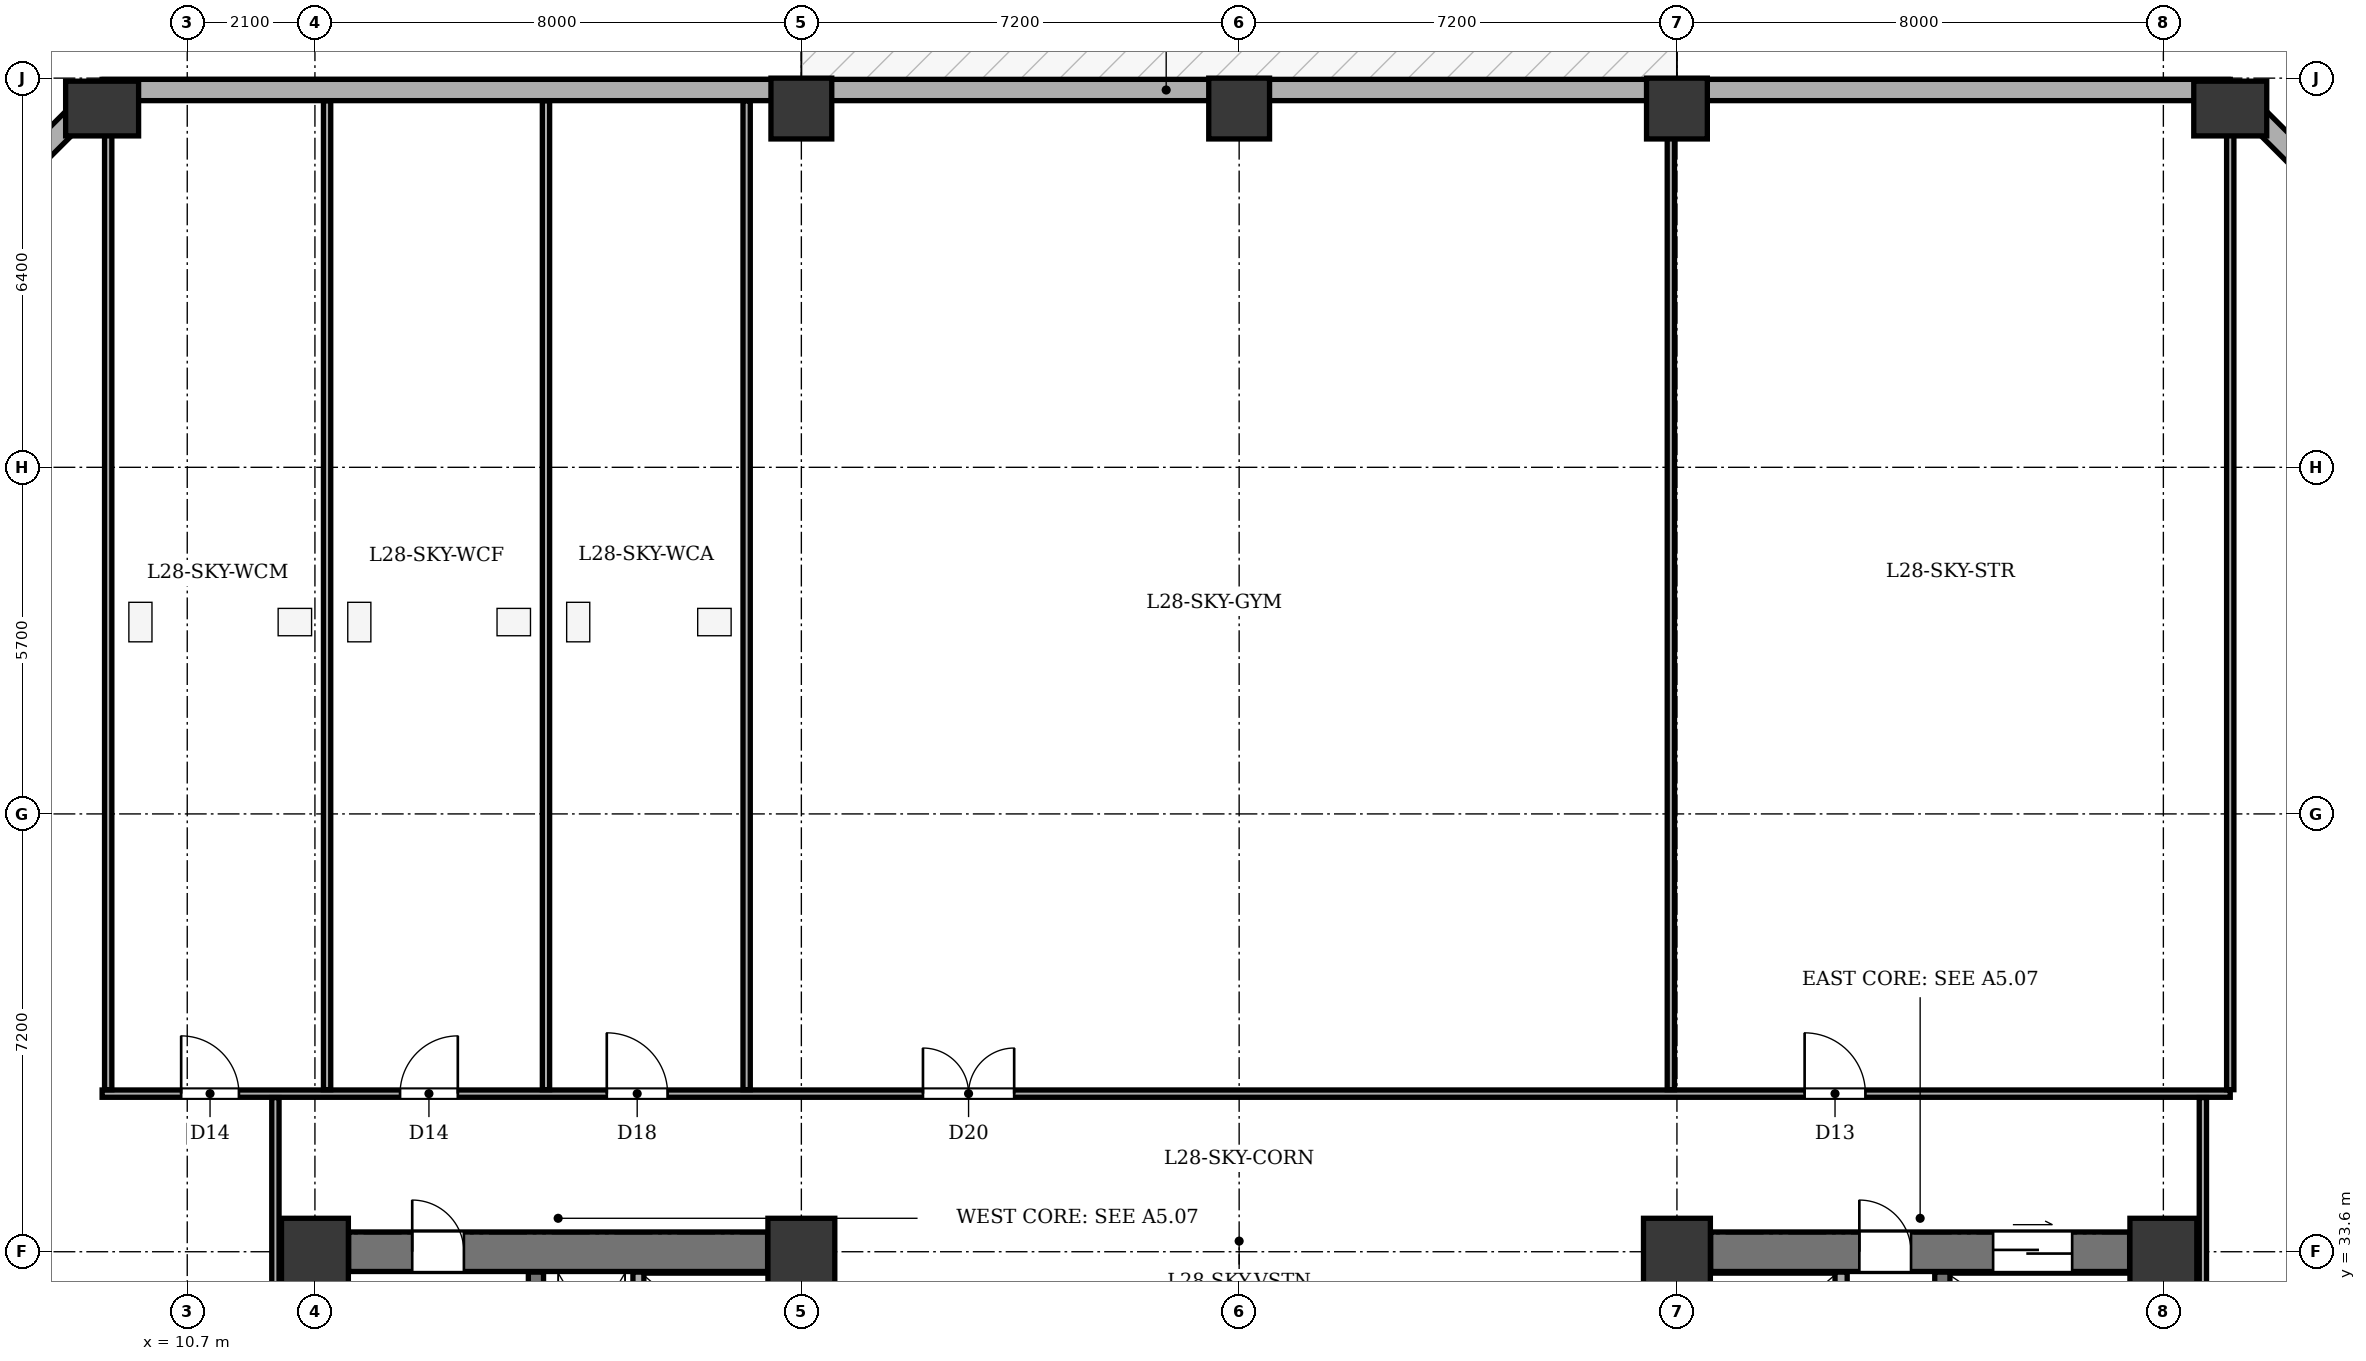
"""IFC4 building model, lengths in metres.
Left out: names, types, materials, properties, quantities, classifications, styles, units other than length and angle.
Written with IfcOpenShell. Run it as: python <this file> out.ifc"""

import sys

from ifc_helpers import new_model, si_unit, direction, frame, frame_2d, origin, origin_2d, place, context, subcontext, project, spatial, rectangle, extrude, element, fill, save


model = new_model("IFC4")
c1 = context("Model", 3, precision=1e-05, world=origin(), true_north=direction((0.0, 1.0)))
c2 = subcontext(c1, "Body", "Model", "MODEL_VIEW")
j1 = project(units=[si_unit("LENGTHUNIT", "METRE"), si_unit("PLANEANGLEUNIT", "RADIAN")], contexts=[c1])
p1 = place(None, origin())
s1 = spatial("IfcSite", under=j1, at=p1, CompositionType="ELEMENT")
p2 = place(p1, origin())
s2 = spatial("IfcBuilding", under=s1, at=p2, CompositionType="ELEMENT")
p3 = place(p2, frame((0.0, 0.0, 115.5)))
s3 = spatial("IfcBuildingStorey", under=s2, at=p3, CompositionType="ELEMENT", Elevation=115.5)
for number, where, z_axis, x_axis in (
    (1, (12.8, 33.6, 0.0), (0.0, 0.0, 1.0), (1.0, 0.0, 0.0)),
    (2, (20.8, 33.6, 0.0), (0.0, 0.0, 1.0), (1.0, 0.0, 0.0)),
    (3, (35.2, 33.6, 0.0), (0.0, 0.0, 1.0), (1.0, 0.0, 0.0)),
    (4, (43.2, 33.6, 0.0), (0.0, 0.0, 1.0), (1.0, 0.0, 0.0)),
):
    element("IfcColumn", number, at=place(p3, frame(where, z_axis=z_axis, x_axis=x_axis)), inside=s3, PredefinedType="COLUMN", context=c2, shape_type="SweptSolid", body=[
        extrude(rectangle(XDim=1.1, YDim=1.1, at=origin_2d()), origin(), (0.0, 0.0, 1.0), 4.8),
    ])
p4 = place(p3, frame((9.3, 52.4, 0.0), z_axis=(0.0, 0.0, 1.0), x_axis=(1.0, 0.0, 0.0)))
e5 = element("IfcColumn", 5, at=p4, inside=s3, PredefinedType="COLUMN", context=c2, shape_type="SweptSolid", body=[
    extrude(rectangle(XDim=0.9, YDim=1.2, at=origin_2d()), origin(), (0.0, 0.0, 1.0), 4.8),
])
for number, where, z_axis, x_axis in (
    (6, (20.8, 52.4, 0.0), (0.0, 0.0, 1.0), (1.0, 0.0, 0.0)),
    (7, (28.0, 52.4, 0.0), (0.0, 0.0, 1.0), (1.0, 0.0, 0.0)),
    (8, (35.2, 52.4, 0.0), (0.0, 0.0, 1.0), (1.0, 0.0, 0.0)),
):
    element("IfcColumn", number, at=place(p3, frame(where, z_axis=z_axis, x_axis=x_axis)), inside=s3, PredefinedType="COLUMN", context=c2, shape_type="SweptSolid", body=[
        extrude(rectangle(XDim=1.0, YDim=1.0, at=origin_2d()), origin(), (0.0, 0.0, 1.0), 4.8),
    ])
p5 = place(p3, frame((44.3, 52.4, 0.0), z_axis=(0.0, 0.0, 1.0), x_axis=(1.0, 0.0, 0.0)))
e9 = element("IfcColumn", 9, at=p5, inside=s3, PredefinedType="COLUMN", context=c2, shape_type="SweptSolid", body=[
    extrude(rectangle(XDim=0.9, YDim=1.2, at=origin_2d()), origin(), (0.0, 0.0, 1.0), 4.8),
])
p6 = place(p3, frame((4.495, 47.9, 0.0), z_axis=(0.0, 0.0, 1.0), x_axis=(0.707088817216, 0.7071247447, 0.0)))
e10 = element("IfcWall", 10, at=p6, inside=s3, PredefinedType="STANDARD", context=c2, shape_type="SweptSolid", body=[
    extrude(rectangle(XDim=6.795, YDim=0.35, at=frame_2d((3.398, 0.0))), origin(), (0.0, 0.0, 1.0), 3.735),
])
p7 = place(p3, frame((9.3, 52.705, 0.0), z_axis=(0.0, 0.0, 1.0), x_axis=(1.0, 0.0, 0.0)))
e11 = element("IfcWall", 11, at=p7, inside=s3, PredefinedType="STANDARD", context=c2, shape_type="SweptSolid", body=[
    extrude(rectangle(XDim=35.0, YDim=0.35, at=frame_2d((17.5, 0.0))), origin(), (0.0, 0.0, 1.0), 3.735),
])
p8 = place(p3, frame((44.3, 52.705, 0.0), z_axis=(0.0, 0.0, 1.0), x_axis=(0.707088817216, -0.7071247447, 0.0)))
e12 = element("IfcWall", 12, at=p8, inside=s3, PredefinedType="STANDARD", context=c2, shape_type="SweptSolid", body=[
    extrude(rectangle(XDim=6.795, YDim=0.35, at=frame_2d((3.398, 0.0))), origin(), (0.0, 0.0, 1.0), 3.735),
])
p9 = place(p3, frame((13.355, 33.6, 0.0), z_axis=(0.0, 0.0, 1.0), x_axis=(1.0, 0.0, 0.0)))
e13 = element("IfcWall", 13, at=p9, inside=s3, PredefinedType="SHEAR", context=c2, shape_type="SweptSolid", body=[
    extrude(rectangle(XDim=6.89, YDim=0.65, at=frame_2d((3.445, 0.0))), origin(), (0.0, 0.0, 1.0), 4.35),
])
p10 = place(p9, frame((1.045, 0.0, 0.0)))
e14 = element("IfcOpeningElement", 14, at=p10, cuts=e13, PredefinedType="OPENING", context=c2, shape_type="SweptSolid", body=[
    extrude(rectangle(XDim=0.85, YDim=2.02, at=frame_2d((0.425, 1.01))), frame((0.0, 0.335, 0.0), z_axis=(0.0, -1.0, 0.0), x_axis=(1.0, 0.0, 0.0)), (0.0, 0.0, 1.0), 0.67),
])
p11 = place(p3, frame((16.435, 21.135, 0.0), z_axis=(0.0, 0.0, 1.0), x_axis=(0.0, 1.0, 0.0)))
e15 = element("IfcWall", 15, at=p11, inside=s3, PredefinedType="SHEAR", context=c2, shape_type="SweptSolid", body=[
    extrude(rectangle(XDim=12.13, YDim=0.25, at=frame_2d((6.065, 0.0))), origin(), (0.0, 0.0, 1.0), 4.35),
])
p12 = place(p11, frame((0.515, 0.0, 0.0)))
e16 = element("IfcOpeningElement", 16, at=p12, cuts=e15, PredefinedType="OPENING", context=c2, shape_type="SweptSolid", body=[
    extrude(rectangle(XDim=1.2, YDim=2.15, at=frame_2d((0.6, 1.075))), frame((0.0, 0.135, 0.0), z_axis=(0.0, -1.0, 0.0), x_axis=(1.0, 0.0, 0.0)), (0.0, 0.0, 1.0), 0.27),
])
p13 = place(p11, frame((2.665, 0.0, 0.0)))
e17 = element("IfcOpeningElement", 17, at=p13, cuts=e15, PredefinedType="OPENING", context=c2, shape_type="SweptSolid", body=[
    extrude(rectangle(XDim=1.15, YDim=2.15, at=frame_2d((0.575, 1.075))), frame((0.0, 0.135, 0.0), z_axis=(0.0, -1.0, 0.0), x_axis=(1.0, 0.0, 0.0)), (0.0, 0.0, 1.0), 0.27),
])
p14 = place(p3, frame((18.12, 31.17, 0.0), z_axis=(0.0, 0.0, 1.0), x_axis=(0.0, 1.0, 0.0)))
e18 = element("IfcWall", 18, at=p14, inside=s3, PredefinedType="PARTITIONING", context=c2, shape_type="SweptSolid", body=[
    extrude(rectangle(XDim=2.095, YDim=0.18, at=frame_2d((1.047, 0.0))), origin(), (0.0, 0.0, 1.0), 4.35),
])
p15 = place(p3, frame((35.755, 33.6, 0.0), z_axis=(0.0, 0.0, 1.0), x_axis=(1.0, 0.0, 0.0)))
e19 = element("IfcWall", 19, at=p15, inside=s3, PredefinedType="SHEAR", context=c2, shape_type="SweptSolid", body=[
    extrude(rectangle(XDim=6.89, YDim=0.65, at=frame_2d((3.445, 0.0))), origin(), (0.0, 0.0, 1.0), 4.35),
])
p16 = place(p15, frame((4.645, 0.0, 0.0)))
e20 = element("IfcOpeningElement", 20, at=p16, cuts=e19, PredefinedType="OPENING", context=c2, shape_type="SweptSolid", body=[
    extrude(rectangle(XDim=1.3, YDim=2.15, at=frame_2d((0.65, 1.075))), frame((0.0, 0.335, 0.0), z_axis=(0.0, -1.0, 0.0), x_axis=(1.0, 0.0, 0.0)), (0.0, 0.0, 1.0), 0.67),
])
p17 = place(p15, frame((2.445, 0.0, 0.0)))
e21 = element("IfcOpeningElement", 21, at=p17, cuts=e19, PredefinedType="OPENING", context=c2, shape_type="SweptSolid", body=[
    extrude(rectangle(XDim=0.85, YDim=2.02, at=frame_2d((0.425, 1.01))), frame((0.0, 0.335, 0.0), z_axis=(0.0, -1.0, 0.0), x_axis=(1.0, 0.0, 0.0)), (0.0, 0.0, 1.0), 0.67),
])
p18 = place(p3, frame((39.565, 21.135, 0.0), z_axis=(0.0, 0.0, 1.0), x_axis=(0.0, 1.0, 0.0)))
e22 = element("IfcWall", 22, at=p18, inside=s3, PredefinedType="SHEAR", context=c2, shape_type="SweptSolid", body=[
    extrude(rectangle(XDim=12.13, YDim=0.25, at=frame_2d((6.065, 0.0))), origin(), (0.0, 0.0, 1.0), 4.35),
])
p19 = place(p18, frame((0.515, 0.0, 0.0)))
e23 = element("IfcOpeningElement", 23, at=p19, cuts=e22, PredefinedType="OPENING", context=c2, shape_type="SweptSolid", body=[
    extrude(rectangle(XDim=1.2, YDim=2.15, at=frame_2d((0.6, 1.075))), frame((0.0, 0.135, 0.0), z_axis=(0.0, -1.0, 0.0), x_axis=(1.0, 0.0, 0.0)), (0.0, 0.0, 1.0), 0.27),
])
p20 = place(p18, frame((2.665, 0.0, 0.0)))
e24 = element("IfcOpeningElement", 24, at=p20, cuts=e22, PredefinedType="OPENING", context=c2, shape_type="SweptSolid", body=[
    extrude(rectangle(XDim=1.15, YDim=2.15, at=frame_2d((0.575, 1.075))), frame((0.0, 0.135, 0.0), z_axis=(0.0, -1.0, 0.0), x_axis=(1.0, 0.0, 0.0)), (0.0, 0.0, 1.0), 0.27),
])
p21 = place(p3, frame((37.9, 25.27, 0.0), z_axis=(0.0, 0.0, 1.0), x_axis=(0.0, 1.0, 0.0)))
e25 = element("IfcWall", 25, at=p21, inside=s3, PredefinedType="SOLIDWALL", context=c2, shape_type="SweptSolid", body=[
    extrude(rectangle(XDim=7.995, YDim=0.2, at=frame_2d((3.998, 0.0))), origin(), (0.0, 0.0, 1.0), 4.35),
])
p22 = place(p3, frame((9.3, 36.2, 0.0), z_axis=(0.0, 0.0, 1.0), x_axis=(1.0, 0.0, 0.0)))
e26 = element("IfcWall", 26, at=p22, inside=s3, PredefinedType="PARTITIONING", context=c2, shape_type="SweptSolid", body=[
    extrude(rectangle(XDim=35.0, YDim=0.12, at=frame_2d((17.5, 0.0))), origin(), (0.0, 0.0, 1.0), 4.35),
])
p23 = place(p22, frame((1.3, 0.0, 0.0)))
e27 = element("IfcOpeningElement", 27, at=p23, cuts=e26, PredefinedType="OPENING", context=c2, shape_type="SweptSolid", body=[
    extrude(rectangle(XDim=0.95, YDim=2.1, at=frame_2d((0.475, 1.05))), frame((0.0, 0.07, 0.0), z_axis=(0.0, -1.0, 0.0), x_axis=(1.0, 0.0, 0.0)), (0.0, 0.0, 1.0), 0.14),
])
p24 = place(p22, frame((4.9, 0.0, 0.0)))
e28 = element("IfcOpeningElement", 28, at=p24, cuts=e26, PredefinedType="OPENING", context=c2, shape_type="SweptSolid", body=[
    extrude(rectangle(XDim=0.95, YDim=2.1, at=frame_2d((0.475, 1.05))), frame((0.0, 0.07, 0.0), z_axis=(0.0, -1.0, 0.0), x_axis=(1.0, 0.0, 0.0)), (0.0, 0.0, 1.0), 0.14),
])
p25 = place(p22, frame((8.3, 0.0, 0.0)))
e29 = element("IfcOpeningElement", 29, at=p25, cuts=e26, PredefinedType="OPENING", context=c2, shape_type="SweptSolid", body=[
    extrude(rectangle(XDim=1.0, YDim=2.1, at=frame_2d((0.5, 1.05))), frame((0.0, 0.07, 0.0), z_axis=(0.0, -1.0, 0.0), x_axis=(1.0, 0.0, 0.0)), (0.0, 0.0, 1.0), 0.14),
])
p26 = place(p22, frame((13.5, 0.0, 0.0)))
e30 = element("IfcOpeningElement", 30, at=p26, cuts=e26, PredefinedType="OPENING", context=c2, shape_type="SweptSolid", body=[
    extrude(rectangle(XDim=1.5, YDim=2.15, at=frame_2d((0.75, 1.075))), frame((0.0, 0.07, 0.0), z_axis=(0.0, -1.0, 0.0), x_axis=(1.0, 0.0, 0.0)), (0.0, 0.0, 1.0), 0.14),
])
p27 = place(p22, frame((28.0, 0.0, 0.0)))
e31 = element("IfcOpeningElement", 31, at=p27, cuts=e26, PredefinedType="OPENING", context=c2, shape_type="SweptSolid", body=[
    extrude(rectangle(XDim=1.0, YDim=2.1, at=frame_2d((0.5, 1.05))), frame((0.0, 0.07, 0.0), z_axis=(0.0, -1.0, 0.0), x_axis=(1.0, 0.0, 0.0)), (0.0, 0.0, 1.0), 0.14),
])
p28 = place(p3, frame((9.4, 36.265, 0.0), z_axis=(0.0, 0.0, 1.0), x_axis=(0.0, 1.0, 0.0)))
e32 = element("IfcWall", 32, at=p28, inside=s3, PredefinedType="PARTITIONING", context=c2, shape_type="SweptSolid", body=[
    extrude(rectangle(XDim=16.26, YDim=0.12, at=frame_2d((8.13, 0.0))), origin(), (0.0, 0.0, 1.0), 2.935),
])
p29 = place(p3, frame((13.0, 36.265, 0.0), z_axis=(0.0, 0.0, 1.0), x_axis=(0.0, 1.0, 0.0)))
e33 = element("IfcWall", 33, at=p29, inside=s3, PredefinedType="PARTITIONING", context=c2, shape_type="SweptSolid", body=[
    extrude(rectangle(XDim=16.26, YDim=0.12, at=frame_2d((8.13, 0.0))), origin(), (0.0, 0.0, 1.0), 4.35),
])
p30 = place(p3, frame((16.6, 36.265, 0.0), z_axis=(0.0, 0.0, 1.0), x_axis=(0.0, 1.0, 0.0)))
e34 = element("IfcWall", 34, at=p30, inside=s3, PredefinedType="PARTITIONING", context=c2, shape_type="SweptSolid", body=[
    extrude(rectangle(XDim=16.26, YDim=0.12, at=frame_2d((8.13, 0.0))), origin(), (0.0, 0.0, 1.0), 3.785),
])
p31 = place(p3, frame((19.9, 36.265, 0.0), z_axis=(0.0, 0.0, 1.0), x_axis=(0.0, 1.0, 0.0)))
e35 = element("IfcWall", 35, at=p31, inside=s3, PredefinedType="PARTITIONING", context=c2, shape_type="SweptSolid", body=[
    extrude(rectangle(XDim=16.26, YDim=0.12, at=frame_2d((8.13, 0.0))), origin(), (0.0, 0.0, 1.0), 4.35),
])
p32 = place(p3, frame((44.3, 36.265, 0.0), z_axis=(0.0, 0.0, 1.0), x_axis=(0.0, 1.0, 0.0)))
e36 = element("IfcWall", 36, at=p32, inside=s3, PredefinedType="PARTITIONING", context=c2, shape_type="SweptSolid", body=[
    extrude(rectangle(XDim=16.26, YDim=0.12, at=frame_2d((8.13, 0.0))), origin(), (0.0, 0.0, 1.0), 2.935),
])
p33 = place(p3, frame((35.1, 36.265, 0.0), z_axis=(0.0, 0.0, 1.0), x_axis=(0.0, 1.0, 0.0)))
e37 = element("IfcWall", 37, at=p33, inside=s3, PredefinedType="PARTITIONING", context=c2, shape_type="SweptSolid", body=[
    extrude(rectangle(XDim=16.26, YDim=0.12, at=frame_2d((8.13, 0.0))), origin(), (0.0, 0.0, 1.0), 3.535),
])
p34 = place(p3, frame((12.15, 18.465, 0.0), z_axis=(0.0, 0.0, 1.0), x_axis=(0.0, 1.0, 0.0)))
e38 = element("IfcWall", 38, at=p34, inside=s3, PredefinedType="PARTITIONING", context=c2, shape_type="SweptSolid", body=[
    extrude(rectangle(XDim=17.67, YDim=0.12, at=frame_2d((8.835, 0.0))), origin(), (0.0, 0.0, 1.0), 4.35),
])
p35 = place(p34, frame((0.385, 0.0, 0.0)))
e39 = element("IfcOpeningElement", 39, at=p35, cuts=e38, PredefinedType="OPENING", context=c2, shape_type="SweptSolid", body=[
    extrude(rectangle(XDim=1.1, YDim=2.15, at=frame_2d((0.55, 1.075))), frame((0.0, 0.07, 0.0), z_axis=(0.0, -1.0, 0.0), x_axis=(1.0, 0.0, 0.0)), (0.0, 0.0, 1.0), 0.14),
])
p36 = place(p3, frame((43.85, 18.465, 0.0), z_axis=(0.0, 0.0, 1.0), x_axis=(0.0, 1.0, 0.0)))
e40 = element("IfcWall", 40, at=p36, inside=s3, PredefinedType="PARTITIONING", context=c2, shape_type="SweptSolid", body=[
    extrude(rectangle(XDim=17.67, YDim=0.12, at=frame_2d((8.835, 0.0))), origin(), (0.0, 0.0, 1.0), 2.935),
])
p37 = place(p36, frame((0.385, 0.0, 0.0)))
e41 = element("IfcOpeningElement", 41, at=p37, cuts=e40, PredefinedType="OPENING", context=c2, shape_type="SweptSolid", body=[
    extrude(rectangle(XDim=1.1, YDim=2.15, at=frame_2d((0.55, 1.075))), frame((0.0, 0.07, 0.0), z_axis=(0.0, -1.0, 0.0), x_axis=(1.0, 0.0, 0.0)), (0.0, 0.0, 1.0), 0.14),
])
p38 = place(p10, origin())
e42 = element("IfcDoor", 42, at=p38, inside=s3, OperationType="SINGLE_SWING_LEFT", PredefinedType="DOOR", context=c2, shape_type="SweptSolid", body=[
    extrude(rectangle(XDim=0.85, YDim=2.02, at=frame_2d((0.425, 1.01))), frame((0.0, 0.025, 0.0), z_axis=(0.0, -1.0, 0.0), x_axis=(1.0, 0.0, 0.0)), (0.0, 0.0, 1.0), 0.05),
])
fill(e14, e42)
p39 = place(p16, origin())
e43 = element("IfcDoor", 43, at=p39, inside=s3, OperationType="DOUBLE_DOOR_SLIDING", PredefinedType="DOOR", context=c2, shape_type="SweptSolid", body=[
    extrude(rectangle(XDim=1.3, YDim=2.15, at=frame_2d((0.65, 1.075))), frame((0.0, 0.025, 0.0), z_axis=(0.0, -1.0, 0.0), x_axis=(1.0, 0.0, 0.0)), (0.0, 0.0, 1.0), 0.05),
])
fill(e20, e43)
p40 = place(p17, origin())
e44 = element("IfcDoor", 44, at=p40, inside=s3, OperationType="SINGLE_SWING_LEFT", PredefinedType="DOOR", context=c2, shape_type="SweptSolid", body=[
    extrude(rectangle(XDim=0.85, YDim=2.02, at=frame_2d((0.425, 1.01))), frame((0.0, 0.025, 0.0), z_axis=(0.0, -1.0, 0.0), x_axis=(1.0, 0.0, 0.0)), (0.0, 0.0, 1.0), 0.05),
])
fill(e21, e44)
p41 = place(p23, origin())
e45 = element("IfcDoor", 45, at=p41, inside=s3, OperationType="SINGLE_SWING_LEFT", PredefinedType="DOOR", context=c2, shape_type="SweptSolid", body=[
    extrude(rectangle(XDim=0.95, YDim=2.1, at=frame_2d((0.475, 1.05))), frame((0.0, 0.025, 0.0), z_axis=(0.0, -1.0, 0.0), x_axis=(1.0, 0.0, 0.0)), (0.0, 0.0, 1.0), 0.05),
])
fill(e27, e45)
p42 = place(p24, origin())
e46 = element("IfcDoor", 46, at=p42, inside=s3, OperationType="SINGLE_SWING_RIGHT", PredefinedType="DOOR", context=c2, shape_type="SweptSolid", body=[
    extrude(rectangle(XDim=0.95, YDim=2.1, at=frame_2d((0.475, 1.05))), frame((0.0, 0.025, 0.0), z_axis=(0.0, -1.0, 0.0), x_axis=(1.0, 0.0, 0.0)), (0.0, 0.0, 1.0), 0.05),
])
fill(e28, e46)
p43 = place(p25, origin())
e47 = element("IfcDoor", 47, at=p43, inside=s3, OperationType="SINGLE_SWING_LEFT", PredefinedType="DOOR", context=c2, shape_type="SweptSolid", body=[
    extrude(rectangle(XDim=1.0, YDim=2.1, at=frame_2d((0.5, 1.05))), frame((0.0, 0.025, 0.0), z_axis=(0.0, -1.0, 0.0), x_axis=(1.0, 0.0, 0.0)), (0.0, 0.0, 1.0), 0.05),
])
fill(e29, e47)
p44 = place(p26, origin())
e48 = element("IfcDoor", 48, at=p44, inside=s3, OperationType="DOUBLE_DOOR_SINGLE_SWING", PredefinedType="DOOR", context=c2, shape_type="SweptSolid", body=[
    extrude(rectangle(XDim=1.5, YDim=2.15, at=frame_2d((0.75, 1.075))), frame((0.0, 0.025, 0.0), z_axis=(0.0, -1.0, 0.0), x_axis=(1.0, 0.0, 0.0)), (0.0, 0.0, 1.0), 0.05),
])
fill(e30, e48)
p45 = place(p27, origin())
e49 = element("IfcDoor", 49, at=p45, inside=s3, OperationType="SINGLE_SWING_LEFT", PredefinedType="DOOR", context=c2, shape_type="SweptSolid", body=[
    extrude(rectangle(XDim=1.0, YDim=2.1, at=frame_2d((0.5, 1.05))), frame((0.0, 0.025, 0.0), z_axis=(0.0, -1.0, 0.0), x_axis=(1.0, 0.0, 0.0)), (0.0, 0.0, 1.0), 0.05),
])
fill(e31, e49)
save(model, sys.argv[1])
